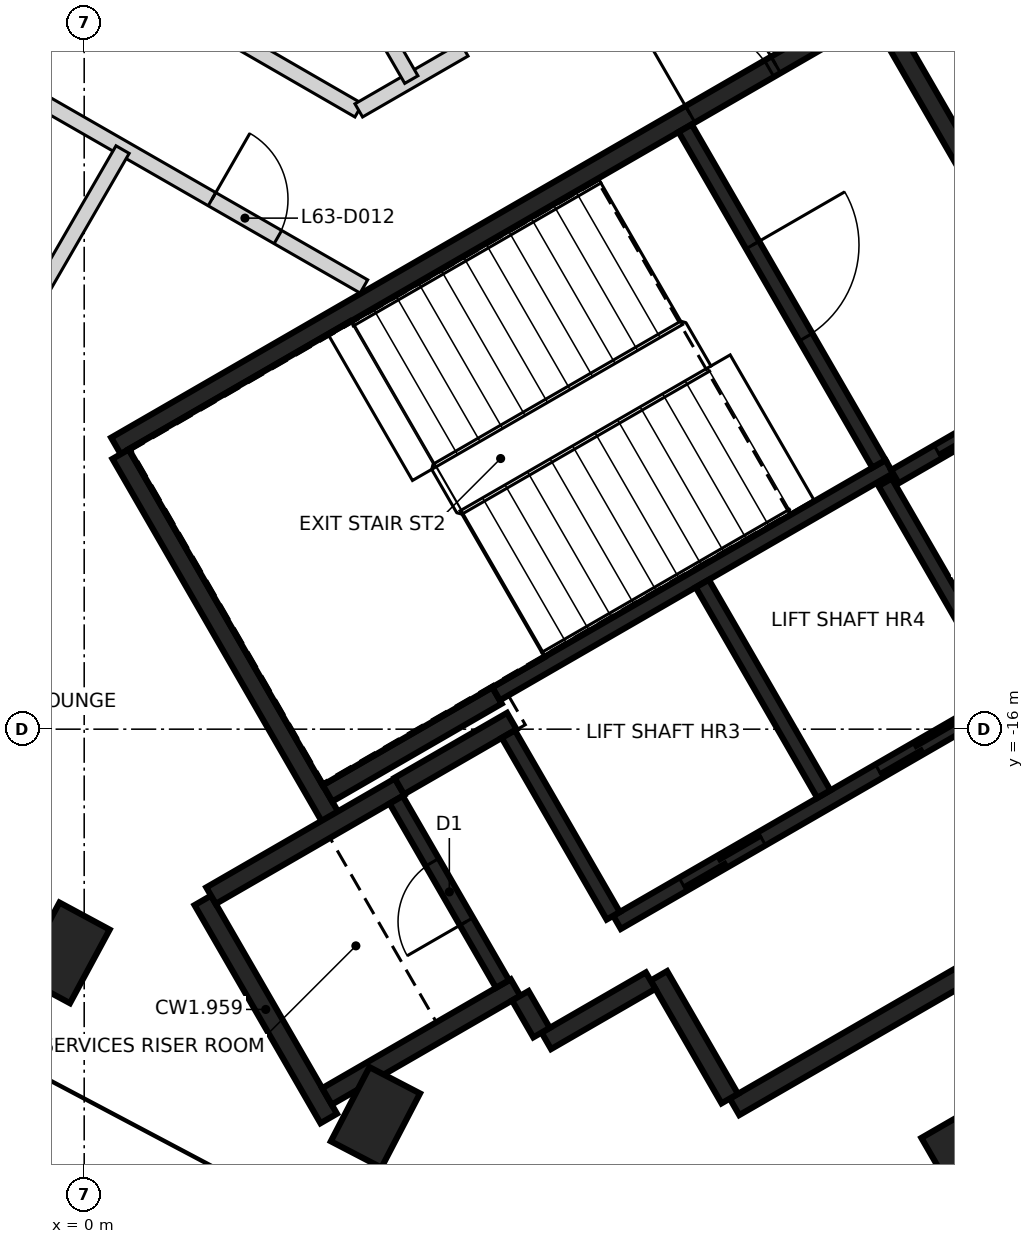
"""IFC4 building model, lengths in metres.
Left out: names, types, materials, properties, quantities, classifications, styles, units other than length and angle.
Written with IfcOpenShell. Run it as: python <this file> out.ifc"""

import sys

from ifc_helpers import new_model, si_unit, direction, frame, frame_2d, origin, origin_2d, place, context, subcontext, project, spatial, rectangle, extrude, element, fill, save


model = new_model("IFC4")
c1 = context("Model", 3, precision=1e-05, world=origin(), true_north=direction((0.0, 1.0)))
c2 = subcontext(c1, "Body", "Model", "MODEL_VIEW")
j1 = project(units=[si_unit("LENGTHUNIT", "METRE"), si_unit("PLANEANGLEUNIT", "RADIAN")], contexts=[c1])
p1 = place(None, origin())
s1 = spatial("IfcSite", under=j1, at=p1, CompositionType="ELEMENT")
p2 = place(p1, origin())
s2 = spatial("IfcBuilding", under=s1, at=p2, CompositionType="ELEMENT")
p3 = place(p2, frame((0.0, 0.0, 250.2)))
s3 = spatial("IfcBuildingStorey", under=s2, at=p3, CompositionType="ELEMENT", Elevation=250.2)
for number, where, z_axis, x_axis in (
    (1, (-0.256, -18.943, -0.35), (0.0, 0.0, 1.0), (0.475, 0.88, 0.0)),
    (2, (3.832, -21.107, -0.35), (0.0, 0.0, 1.0), (0.461, 0.887, 0.0)),
):
    element("IfcColumn", number, at=place(p3, frame(where, z_axis=z_axis, x_axis=x_axis)), inside=s3, PredefinedType="COLUMN", context=c2, shape_type="SweptSolid", body=[
        extrude(rectangle(XDim=1.1, YDim=0.75, at=origin_2d()), origin(), (0.0, 0.0, 1.0), 3.6),
    ])
p4 = place(p3, frame((12.71, -22.015, -0.35), z_axis=(0.0, 0.0, 1.0), x_axis=(-0.5, 0.866025403784, 0.0)))
e3 = element("IfcColumn", 3, at=p4, inside=s3, PredefinedType="COLUMN", context=c2, shape_type="SweptSolid", body=[
    extrude(rectangle(XDim=2.8, YDim=2.3, at=origin_2d()), origin(), (0.0, 0.0, 1.0), 3.6),
])
p5 = place(p3, frame((0.417, -12.273, 0.0), z_axis=(0.0, 0.0, 1.0), x_axis=(0.866021906294, 0.500006057782, 0.0)))
e4 = element("IfcWall", 4, at=p5, inside=s3, PredefinedType="SHEAR", context=c2, shape_type="SweptSolid", body=[
    extrude(rectangle(XDim=11.55, YDim=0.25, at=frame_2d((5.775, 0.0))), origin(), (0.0, 0.0, 1.0), 3.25),
])
p6 = place(p5, frame((10.025, 0.0, 0.0)))
e5 = element("IfcOpeningElement", 5, at=p6, cuts=e4, PredefinedType="OPENING", context=c2, shape_type="SweptSolid", body=[
    extrude(rectangle(XDim=1.2, YDim=2.1, at=frame_2d((0.6, 1.05))), frame((0.0, 0.135, 0.0), z_axis=(0.0, -1.0, 0.0), x_axis=(1.0, 0.0, 0.0)), (0.0, 0.0, 1.0), 0.27),
])
p7 = place(p5, frame((8.725, 0.0, 0.0)))
e6 = element("IfcOpeningElement", 6, at=p7, cuts=e4, PredefinedType="OPENING", context=c2, shape_type="SweptSolid", body=[
    extrude(rectangle(XDim=1.2, YDim=2.1, at=frame_2d((0.6, 1.05))), frame((0.0, 0.135, 0.0), z_axis=(0.0, -1.0, 0.0), x_axis=(1.0, 0.0, 0.0)), (0.0, 0.0, 1.0), 0.27),
])
p8 = place(p3, frame((16.133, -16.594, 0.0), z_axis=(0.0, 0.0, 1.0), x_axis=(-0.866022959057, -0.500004234368, 0.0)))
e7 = element("IfcWall", 7, at=p8, inside=s3, PredefinedType="SHEAR", context=c2, shape_type="SweptSolid", body=[
    extrude(rectangle(XDim=8.75, YDim=0.25, at=frame_2d((4.375, 0.0))), origin(), (0.0, 0.0, 1.0), 3.25),
])
p9 = place(p3, frame((3.235, -17.153, 0.0), z_axis=(0.0, 0.0, 1.0), x_axis=(-0.500008851346, 0.866020293397, 0.0)))
e8 = element("IfcWall", 8, at=p9, inside=s3, PredefinedType="SHEAR", context=c2, shape_type="SweptSolid", body=[
    extrude(rectangle(XDim=5.51, YDim=0.25, at=frame_2d((2.755, 0.0))), origin(), (0.0, 0.0, 1.0), 3.25),
])
p10 = place(p3, frame((10.483, -6.606, 0.0), z_axis=(0.0, 0.0, 1.0), x_axis=(0.49999885962, -0.866026062182, 0.0)))
e9 = element("IfcWall", 9, at=p10, inside=s3, PredefinedType="SHEAR", context=c2, shape_type="SweptSolid", body=[
    extrude(rectangle(XDim=5.225, YDim=0.25, at=frame_2d((2.612, 0.0))), origin(), (0.0, 0.0, 1.0), 3.25),
])
p11 = place(p3, frame((3.217, -21.122, 0.0), z_axis=(0.0, 0.0, 1.0), x_axis=(-0.499998874531, 0.866026053573, 0.0)))
e10 = element("IfcWall", 10, at=p11, inside=s3, PredefinedType="SHEAR", context=c2, shape_type="SweptSolid", body=[
    extrude(rectangle(XDim=3.313, YDim=0.25, at=frame_2d((1.656, 0.0))), origin(), (0.0, 0.0, 1.0), 3.25),
])
p12 = place(p3, frame((1.669, -18.19, 0.0), z_axis=(0.0, 0.0, 1.0), x_axis=(0.866042235819, 0.499970844928, 0.0)))
e11 = element("IfcWall", 11, at=p12, inside=s3, PredefinedType="SHEAR", context=c2, shape_type="SweptSolid", body=[
    extrude(rectangle(XDim=2.865, YDim=0.25, at=frame_2d((1.432, 0.0))), origin(), (0.0, 0.0, 1.0), 3.25),
])
p13 = place(p3, frame((5.675, -19.399, 0.0), z_axis=(0.0, 0.0, 1.0), x_axis=(-0.866026637627, -0.499997862916, 0.0)))
e12 = element("IfcWall", 12, at=p13, inside=s3, PredefinedType="SHEAR", context=c2, shape_type="SweptSolid", body=[
    extrude(rectangle(XDim=2.865, YDim=0.25, at=frame_2d((1.432, 0.0))), origin(), (0.0, 0.0, 1.0), 3.25),
])
p14 = place(p3, frame((5.431, -15.556, 0.0), z_axis=(0.0, 0.0, 1.0), x_axis=(-0.866022940537, -0.500004266446, 0.0)))
e13 = element("IfcWall", 13, at=p14, inside=s3, PredefinedType="SHEAR", context=c2, shape_type="SweptSolid", body=[
    extrude(rectangle(XDim=2.575, YDim=0.25, at=frame_2d((1.287, 0.0))), origin(), (0.0, 0.0, 1.0), 3.25),
])
p15 = place(p3, frame((8.493, -20.86, 0.0), z_axis=(0.0, 0.0, 1.0), x_axis=(-0.500039802285, 0.866002422705, 0.0)))
e14 = element("IfcWall", 14, at=p15, inside=s3, PredefinedType="SHEAR", context=c2, shape_type="SweptSolid", body=[
    extrude(rectangle(XDim=1.865, YDim=0.25, at=frame_2d((0.932, 0.0))), origin(), (0.0, 0.0, 1.0), 3.25),
])
p16 = place(p3, frame((4.145, -16.749, 0.0), z_axis=(0.0, 0.0, 1.0), x_axis=(0.866038183914, 0.499977863513, 0.0)))
e15 = element("IfcWall", 15, at=p16, inside=s3, PredefinedType="SHEAR", context=c2, shape_type="SweptSolid", body=[
    extrude(rectangle(XDim=1.71, YDim=0.25, at=frame_2d((0.855, 0.0))), origin(), (0.0, 0.0, 1.0), 3.25),
])
p17 = place(p3, frame((7.452, -19.308, 0.0), z_axis=(0.0, 0.0, 1.0), x_axis=(-0.866044474677, -0.49996696679, 0.0)))
e16 = element("IfcWall", 16, at=p17, inside=s3, PredefinedType="SHEAR", context=c2, shape_type="SweptSolid", body=[
    extrude(rectangle(XDim=1.584, YDim=0.25, at=frame_2d((0.792, 0.0))), origin(), (0.0, 0.0, 1.0), 3.25),
])
p18 = place(p3, frame((6.017, -19.992, 0.0), z_axis=(0.0, 0.0, 1.0), x_axis=(-0.500364886717, 0.865814633822, 0.0)))
e17 = element("IfcWall", 17, at=p18, inside=s3, PredefinedType="SHEAR", context=c2, shape_type="SweptSolid", body=[
    extrude(rectangle(XDim=0.559, YDim=0.25, at=frame_2d((0.28, 0.0))), origin(), (0.0, 0.0, 1.0), 3.25),
])
p19 = place(p3, frame((5.419, -15.534, 0.0), z_axis=(0.0, 0.0, 1.0), x_axis=(0.866029065029, 0.499993658486, 0.0)))
e18 = element("IfcWall", 18, at=p19, inside=s3, PredefinedType="SHEAR", context=c2, shape_type="SweptSolid", body=[
    extrude(rectangle(XDim=5.974, YDim=0.2, at=frame_2d((2.987, 0.0))), origin(), (0.0, 0.0, 1.0), 3.25),
])
p20 = place(p3, frame((7.01, -18.542, 0.0), z_axis=(0.0, 0.0, 1.0), x_axis=(0.866030299012, 0.499991521122, 0.0)))
e19 = element("IfcWall", 19, at=p20, inside=s3, PredefinedType="SHEAR", context=c2, shape_type="SweptSolid", body=[
    extrude(rectangle(XDim=6.1, YDim=0.2, at=frame_2d((3.05, 0.0))), origin(), (0.0, 0.0, 1.0), 3.25),
])
p21 = place(p20, frame((1.0, 0.0, 0.0)))
e20 = element("IfcOpeningElement", 20, at=p21, cuts=e19, PredefinedType="OPENING", context=c2, shape_type="SweptSolid", body=[
    extrude(rectangle(XDim=1.2, YDim=2.1, at=frame_2d((0.6, 1.05))), frame((0.0, 0.11, 0.0), z_axis=(0.0, -1.0, 0.0), x_axis=(1.0, 0.0, 0.0)), (0.0, 0.0, 1.0), 0.22),
])
p22 = place(p20, frame((3.982, 0.0, 0.0)))
e21 = element("IfcOpeningElement", 21, at=p22, cuts=e19, PredefinedType="OPENING", context=c2, shape_type="SweptSolid", body=[
    extrude(rectangle(XDim=1.2, YDim=2.1, at=frame_2d((0.6, 1.05))), frame((0.0, 0.11, 0.0), z_axis=(0.0, -1.0, 0.0), x_axis=(1.0, 0.0, 0.0)), (0.0, 0.0, 1.0), 0.22),
])
p23 = place(p3, frame((7.906, -8.094, 0.0), z_axis=(0.0, 0.0, 1.0), x_axis=(0.500027839223, -0.866009330205, 0.0)))
e22 = element("IfcWall", 22, at=p23, inside=s3, PredefinedType="SHEAR", context=c2, shape_type="SweptSolid", body=[
    extrude(rectangle(XDim=5.098, YDim=0.2, at=frame_2d((2.549, 0.0))), origin(), (0.0, 0.0, 1.0), 3.25),
])
p24 = place(p23, frame((1.774, 0.0, 0.0)))
e23 = element("IfcOpeningElement", 23, at=p24, cuts=e22, PredefinedType="OPENING", context=c2, shape_type="SweptSolid", body=[
    extrude(rectangle(XDim=1.4, YDim=2.1, at=frame_2d((0.7, 1.05))), frame((0.0, 0.11, 0.0), z_axis=(0.0, -1.0, 0.0), x_axis=(1.0, 0.0, 0.0)), (0.0, 0.0, 1.0), 0.22),
])
p25 = place(p3, frame((8.132, -14.084, 0.0), z_axis=(0.0, 0.0, 1.0), x_axis=(0.499997778408, -0.866026686418, 0.0)))
e24 = element("IfcWall", 24, at=p25, inside=s3, PredefinedType="SHEAR", context=c2, shape_type="SweptSolid", body=[
    extrude(rectangle(XDim=3.198, YDim=0.2, at=frame_2d((1.599, 0.0))), origin(), (0.0, 0.0, 1.0), 3.25),
])
p26 = place(p3, frame((5.503, -19.352, 0.0), z_axis=(0.0, 0.0, 1.0), x_axis=(-0.499986818241, 0.866033014143, 0.0)))
e25 = element("IfcWall", 25, at=p26, inside=s3, PredefinedType="SHEAR", context=c2, shape_type="SweptSolid", body=[
    extrude(rectangle(XDim=2.798, YDim=0.2, at=frame_2d((1.399, 0.0))), origin(), (0.0, 0.0, 1.0), 3.25),
])
p27 = place(p26, frame((0.949, 0.0, 0.0)))
e26 = element("IfcOpeningElement", 26, at=p27, cuts=e25, PredefinedType="OPENING", context=c2, shape_type="SweptSolid", body=[
    extrude(rectangle(XDim=0.9, YDim=2.1, at=frame_2d((0.45, 1.05))), frame((0.0, 0.11, 0.0), z_axis=(0.0, -1.0, 0.0), x_axis=(1.0, 0.0, 0.0)), (0.0, 0.0, 1.0), 0.22),
])
p28 = place(p3, frame((6.96, -18.455, 0.0), z_axis=(0.0, 0.0, 1.0), x_axis=(-0.499926705758, 0.866067716099, 0.0)))
e27 = element("IfcWall", 27, at=p28, inside=s3, PredefinedType="SHEAR", context=c2, shape_type="SweptSolid", body=[
    extrude(rectangle(XDim=2.759, YDim=0.2, at=frame_2d((1.38, 0.0))), origin(), (0.0, 0.0, 1.0), 3.25),
])
p29 = place(p3, frame((12.088, -15.437, 0.0), z_axis=(0.0, 0.0, 1.0), x_axis=(-0.500026960575, 0.86600983753, 0.0)))
e28 = element("IfcWall", 28, at=p29, inside=s3, PredefinedType="SHEAR", context=c2, shape_type="SweptSolid", body=[
    extrude(rectangle(XDim=3.1, YDim=0.2, at=frame_2d((1.55, 0.0))), origin(), (0.0, 0.0, 1.0), 3.25),
])
p30 = place(p3, frame((10.666, -12.678, 0.0), z_axis=(0.0, 0.0, 1.0), x_axis=(0.866018407898, 0.500012117035, 0.0)))
e29 = element("IfcWall", 29, at=p30, inside=s3, PredefinedType="SHEAR", context=c2, shape_type="SweptSolid", body=[
    extrude(rectangle(XDim=2.651, YDim=0.2, at=frame_2d((1.325, 0.0))), origin(), (0.0, 0.0, 1.0), 3.25),
])
p31 = place(p30, frame((0.652, 0.0, 0.0)))
e30 = element("IfcOpeningElement", 30, at=p31, cuts=e29, PredefinedType="OPENING", context=c2, shape_type="SweptSolid", body=[
    extrude(rectangle(XDim=1.3, YDim=2.1, at=frame_2d((0.65, 1.05))), frame((0.0, 0.11, 0.0), z_axis=(0.0, -1.0, 0.0), x_axis=(1.0, 0.0, 0.0)), (0.0, 0.0, 1.0), 0.22),
])
p32 = place(p3, frame((-8.612, -0.801, 0.0), z_axis=(0.0, 0.0, 1.0), x_axis=(0.865998070783, -0.50004733916, 0.0)))
e31 = element("IfcWall", 31, at=p32, inside=s3, PredefinedType="PARTITIONING", context=c2, shape_type="SweptSolid", body=[
    extrude(rectangle(XDim=14.115, YDim=0.2, at=frame_2d((7.058, 0.0))), origin(), (0.0, 0.0, 1.0), 3.25),
])
p33 = place(p32, frame((3.085, 0.0, 0.0)))
e32 = element("IfcOpeningElement", 32, at=p33, cuts=e31, PredefinedType="OPENING", context=c2, shape_type="SweptSolid", body=[
    extrude(rectangle(XDim=0.9, YDim=2.1, at=frame_2d((0.45, 1.05))), frame((0.0, 0.11, 0.0), z_axis=(0.0, -1.0, 0.0), x_axis=(1.0, 0.0, 0.0)), (0.0, 0.0, 1.0), 0.22),
])
p34 = place(p32, frame((10.131, 0.0, 0.0)))
e33 = element("IfcOpeningElement", 33, at=p34, cuts=e31, PredefinedType="OPENING", context=c2, shape_type="SweptSolid", body=[
    extrude(rectangle(XDim=0.9, YDim=2.1, at=frame_2d((0.45, 1.05))), frame((0.0, 0.11, 0.0), z_axis=(0.0, -1.0, 0.0), x_axis=(1.0, 0.0, 0.0)), (0.0, 0.0, 1.0), 0.22),
])
p35 = place(p3, frame((-7.589, -3.702, 0.0), z_axis=(0.0, 0.0, 1.0), x_axis=(0.867107959402, -0.498120253293, 0.0)))
e34 = element("IfcWall", 34, at=p35, inside=s3, PredefinedType="PARTITIONING", context=c2, shape_type="SweptSolid", body=[
    extrude(rectangle(XDim=12.996, YDim=0.2, at=frame_2d((6.498, 0.0))), origin(), (0.0, 0.0, 1.0), 3.25),
])
p36 = place(p35, frame((4.536, 0.0, 0.0)))
e35 = element("IfcOpeningElement", 35, at=p36, cuts=e34, PredefinedType="OPENING", context=c2, shape_type="SweptSolid", body=[
    extrude(rectangle(XDim=0.95, YDim=2.1, at=frame_2d((0.475, 1.05))), frame((0.0, 0.11, 0.0), z_axis=(0.0, -1.0, 0.0), x_axis=(1.0, 0.0, 0.0)), (0.0, 0.0, 1.0), 0.22),
])
p37 = place(p35, frame((10.691, 0.0, 0.0)))
e36 = element("IfcOpeningElement", 36, at=p37, cuts=e34, PredefinedType="OPENING", context=c2, shape_type="SweptSolid", body=[
    extrude(rectangle(XDim=1.0, YDim=2.1, at=frame_2d((0.5, 1.05))), frame((0.0, 0.11, 0.0), z_axis=(0.0, -1.0, 0.0), x_axis=(1.0, 0.0, 0.0)), (0.0, 0.0, 1.0), 0.22),
])
p38 = place(p3, frame((3.612, -7.859, 0.0), z_axis=(0.0, 0.0, 1.0), x_axis=(0.866002901518, 0.500038973044, 0.0)))
e37 = element("IfcWall", 37, at=p38, inside=s3, PredefinedType="PARTITIONING", context=c2, shape_type="SweptSolid", body=[
    extrude(rectangle(XDim=1.602, YDim=0.2, at=frame_2d((0.801, 0.0))), origin(), (0.0, 0.0, 1.0), 3.25),
])
p39 = place(p3, frame((11.216, -5.06, 0.0), z_axis=(0.0, 0.0, 1.0), x_axis=(0.514001858113, -0.857789070726, 0.0)))
e38 = element("IfcWall", 38, at=p39, inside=s3, PredefinedType="PARTITIONING", context=c2, shape_type="SweptSolid", body=[
    extrude(rectangle(XDim=9.161, YDim=0.2, at=frame_2d((4.581, 0.0))), origin(), (0.0, 0.0, 1.0), 3.25),
])
p40 = place(p39, frame((4.437, 0.0, 0.0)))
e39 = element("IfcOpeningElement", 39, at=p40, cuts=e38, PredefinedType="OPENING", context=c2, shape_type="SweptSolid", body=[
    extrude(rectangle(XDim=0.95, YDim=2.1, at=frame_2d((0.475, 1.05))), frame((0.0, 0.11, 0.0), z_axis=(0.0, -1.0, 0.0), x_axis=(1.0, 0.0, 0.0)), (0.0, 0.0, 1.0), 0.22),
])
p41 = place(p3, frame((-5.097, -18.078, 0.0), z_axis=(0.0, 0.0, 1.0), x_axis=(0.49996389635, 0.866046247233, 0.0)))
e40 = element("IfcWall", 40, at=p41, inside=s3, PredefinedType="PARTITIONING", context=c2, shape_type="SweptSolid", body=[
    extrude(rectangle(XDim=11.204, YDim=0.2, at=frame_2d((5.602, 0.0))), origin(), (0.0, 0.0, 1.0), 3.25),
])
p42 = place(p3, frame((3.0, -5.196, 0.0), z_axis=(0.0, 0.0, 1.0), x_axis=(0.500076354988, -0.865981315724, 0.0)))
e41 = element("IfcWall", 41, at=p42, inside=s3, PredefinedType="PARTITIONING", context=c2, shape_type="SweptSolid", body=[
    extrude(rectangle(XDim=2.607, YDim=0.2, at=frame_2d((1.304, 0.0))), origin(), (0.0, 0.0, 1.0), 3.25),
])
p43 = place(p31, origin())
e42 = element("IfcDoor", 42, at=p43, inside=s3, OperationType="SLIDING_TO_LEFT", PredefinedType="DOOR", context=c2, shape_type="SweptSolid", body=[
    extrude(rectangle(XDim=1.3, YDim=2.1, at=frame_2d((0.65, 1.05))), frame((0.0, 0.025, 0.0), z_axis=(0.0, -1.0, 0.0), x_axis=(1.0, 0.0, 0.0)), (0.0, 0.0, 1.0), 0.05),
])
fill(e30, e42)
p44 = place(p21, origin())
e43 = element("IfcDoor", 43, at=p44, inside=s3, OperationType="DOUBLE_DOOR_SLIDING", PredefinedType="DOOR", context=c2, shape_type="SweptSolid", body=[
    extrude(rectangle(XDim=1.2, YDim=2.1, at=frame_2d((0.6, 1.05))), frame((0.0, 0.025, 0.0), z_axis=(0.0, -1.0, 0.0), x_axis=(1.0, 0.0, 0.0)), (0.0, 0.0, 1.0), 0.05),
])
fill(e20, e43)
p45 = place(p22, origin())
e44 = element("IfcDoor", 44, at=p45, inside=s3, OperationType="DOUBLE_DOOR_SLIDING", PredefinedType="DOOR", context=c2, shape_type="SweptSolid", body=[
    extrude(rectangle(XDim=1.2, YDim=2.1, at=frame_2d((0.6, 1.05))), frame((0.0, 0.025, 0.0), z_axis=(0.0, -1.0, 0.0), x_axis=(1.0, 0.0, 0.0)), (0.0, 0.0, 1.0), 0.05),
])
fill(e21, e44)
p46 = place(p6, origin())
e45 = element("IfcDoor", 45, at=p46, inside=s3, OperationType="SINGLE_SWING_LEFT", PredefinedType="DOOR", context=c2, shape_type="SweptSolid", body=[
    extrude(rectangle(XDim=1.2, YDim=2.1, at=frame_2d((0.6, 1.05))), frame((0.0, 0.025, 0.0), z_axis=(0.0, -1.0, 0.0), x_axis=(1.0, 0.0, 0.0)), (0.0, 0.0, 1.0), 0.05),
])
fill(e5, e45)
p47 = place(p7, origin())
e46 = element("IfcDoor", 46, at=p47, inside=s3, OperationType="SINGLE_SWING_RIGHT", PredefinedType="DOOR", context=c2, shape_type="SweptSolid", body=[
    extrude(rectangle(XDim=1.2, YDim=2.1, at=frame_2d((0.6, 1.05))), frame((0.0, 0.025, 0.0), z_axis=(0.0, -1.0, 0.0), x_axis=(1.0, 0.0, 0.0)), (0.0, 0.0, 1.0), 0.05),
])
fill(e6, e46)
p48 = place(p24, origin())
e47 = element("IfcDoor", 47, at=p48, inside=s3, OperationType="SINGLE_SWING_LEFT", PredefinedType="DOOR", context=c2, shape_type="SweptSolid", body=[
    extrude(rectangle(XDim=1.4, YDim=2.1, at=frame_2d((0.7, 1.05))), frame((0.0, 0.025, 0.0), z_axis=(0.0, -1.0, 0.0), x_axis=(1.0, 0.0, 0.0)), (0.0, 0.0, 1.0), 0.05),
])
fill(e23, e47)
p49 = place(p27, origin())
e48 = element("IfcDoor", 48, at=p49, inside=s3, OperationType="SINGLE_SWING_RIGHT", PredefinedType="DOOR", context=c2, shape_type="SweptSolid", body=[
    extrude(rectangle(XDim=0.9, YDim=2.1, at=frame_2d((0.45, 1.05))), frame((0.0, 0.025, 0.0), z_axis=(0.0, -1.0, 0.0), x_axis=(1.0, 0.0, 0.0)), (0.0, 0.0, 1.0), 0.05),
])
fill(e26, e48)
p50 = place(p37, frame((1.0, 0.0, 0.0), z_axis=(0.0, 0.0, 1.0), x_axis=(-1.0, 0.0, 0.0)))
e49 = element("IfcDoor", 49, at=p50, inside=s3, OperationType="SINGLE_SWING_LEFT", PredefinedType="DOOR", context=c2, shape_type="SweptSolid", body=[
    extrude(rectangle(XDim=1.0, YDim=2.1, at=frame_2d((0.5, 1.05))), frame((0.0, 0.025, 0.0), z_axis=(0.0, -1.0, 0.0), x_axis=(1.0, 0.0, 0.0)), (0.0, 0.0, 1.0), 0.05),
])
fill(e36, e49)
save(model, sys.argv[1])
